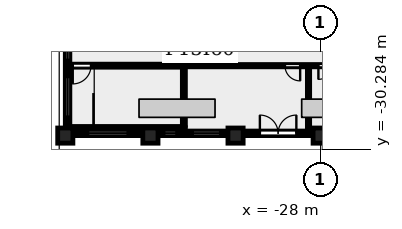
"""IFC4 building model, lengths in metres.
Left out: names, types, materials, properties, quantities, classifications, styles, units other than length and angle.
Written with IfcOpenShell. Run it as: python <this file> out.ifc"""

import sys

from ifc_helpers import new_model, si_unit, direction, frame, frame_2d, origin, origin_2d, place, context, subcontext, project, spatial, rectangle, circle, extrude, element, fill, save


model = new_model("IFC4")
c1 = context("Model", 3, precision=1e-05, world=origin(), true_north=direction((0.0, 1.0)))
c2 = subcontext(c1, "Body", "Model", "MODEL_VIEW")
j1 = project(units=[si_unit("LENGTHUNIT", "METRE"), si_unit("PLANEANGLEUNIT", "RADIAN")], contexts=[c1])
p1 = place(None, origin())
s1 = spatial("IfcSite", under=j1, at=p1, CompositionType="ELEMENT")
p2 = place(p1, origin())
s2 = spatial("IfcBuilding", under=s1, at=p2, CompositionType="ELEMENT")
p3 = place(p2, frame((0.0, 0.0, 25.7)))
s3 = spatial("IfcBuildingStorey", under=s2, at=p3, CompositionType="ELEMENT", Elevation=25.7)
for number, where, z_axis, x_axis in (
    (1, (-44.8, -29.4, 0.0), (0.0, 0.0, 1.0), (1.0, 0.0, 0.0)),
    (2, (-39.2, -29.4, 0.0), (0.0, 0.0, 1.0), (1.0, 0.0, 0.0)),
    (3, (-33.6, -29.4, 0.0), (0.0, 0.0, 1.0), (1.0, 0.0, 0.0)),
    (4, (-28.0, -29.4, 0.0), (0.0, 0.0, 1.0), (1.0, 0.0, 0.0)),
):
    element("IfcColumn", number, at=place(p3, frame(where, z_axis=z_axis, x_axis=x_axis)), inside=s3, PredefinedType="COLUMN", context=c2, shape_type="SweptSolid", body=[
        extrude(circle(Radius=0.5, at=origin_2d()), origin(), (0.0, 0.0, 1.0), 4.8),
    ])
p4 = place(p3, frame((-44.65, -22.9, 0.0), z_axis=(0.0, 0.0, 1.0), x_axis=(0.0, -1.0, 0.0)))
e5 = element("IfcWall", 5, at=p4, inside=s3, PredefinedType="SOLIDWALL", context=c2, shape_type="SweptSolid", body=[
    extrude(rectangle(XDim=6.0, YDim=0.3, at=frame_2d((3.0, 0.0))), origin(), (0.0, 0.0, 1.0), 3.65),
])
p5 = place(p4, frame((0.312, 0.0, 0.6)))
e6 = element("IfcOpeningElement", 6, at=p5, cuts=e5, PredefinedType="OPENING", context=c2, shape_type="SweptSolid", body=[
    extrude(rectangle(XDim=1.2, YDim=1.55, at=frame_2d((0.6, 0.775))), frame((0.0, 0.16, 0.0), z_axis=(0.0, -1.0, 0.0), x_axis=(1.0, 0.0, 0.0)), (0.0, 0.0, 1.0), 0.32),
])
p6 = place(p4, frame((2.65, 0.0, 0.9)))
e7 = element("IfcOpeningElement", 7, at=p6, cuts=e5, PredefinedType="OPENING", context=c2, shape_type="SweptSolid", body=[
    extrude(rectangle(XDim=2.6, YDim=1.25, at=frame_2d((1.3, 0.625))), frame((0.0, 0.16, 0.0), z_axis=(0.0, -1.0, 0.0), x_axis=(1.0, 0.0, 0.0)), (0.0, 0.0, 1.0), 0.32),
])
p7 = place(p3, frame((-44.3, -29.25, 0.0), z_axis=(0.0, 0.0, 1.0), x_axis=(1.0, 0.0, 0.0)))
e8 = element("IfcWall", 8, at=p7, inside=s3, PredefinedType="SOLIDWALL", context=c2, shape_type="SweptSolid", body=[
    extrude(rectangle(XDim=4.6, YDim=0.3, at=frame_2d((2.3, 0.0))), origin(), (0.0, 0.0, 1.0), 3.65),
])
p8 = place(p7, frame((1.0, 0.0, 0.9)))
e9 = element("IfcOpeningElement", 9, at=p8, cuts=e8, PredefinedType="OPENING", context=c2, shape_type="SweptSolid", body=[
    extrude(rectangle(XDim=2.6, YDim=1.25, at=frame_2d((1.3, 0.625))), frame((0.0, 0.16, 0.0), z_axis=(0.0, -1.0, 0.0), x_axis=(1.0, 0.0, 0.0)), (0.0, 0.0, 1.0), 0.32),
])
p9 = place(p3, frame((-38.7, -29.25, 0.0), z_axis=(0.0, 0.0, 1.0), x_axis=(1.0, 0.0, 0.0)))
e10 = element("IfcWall", 10, at=p9, inside=s3, PredefinedType="SOLIDWALL", context=c2, shape_type="SweptSolid", body=[
    extrude(rectangle(XDim=4.6, YDim=0.3, at=frame_2d((2.3, 0.0))), origin(), (0.0, 0.0, 1.0), 3.65),
])
p10 = place(p9, frame((0.413, 0.0, 0.6)))
e11 = element("IfcOpeningElement", 11, at=p10, cuts=e10, PredefinedType="OPENING", context=c2, shape_type="SweptSolid", body=[
    extrude(rectangle(XDim=0.8, YDim=1.55, at=frame_2d((0.4, 0.775))), frame((0.0, 0.16, 0.0), z_axis=(0.0, -1.0, 0.0), x_axis=(1.0, 0.0, 0.0)), (0.0, 0.0, 1.0), 0.32),
])
p11 = place(p9, frame((2.288, 0.0, 0.9)))
e12 = element("IfcOpeningElement", 12, at=p11, cuts=e10, PredefinedType="OPENING", context=c2, shape_type="SweptSolid", body=[
    extrude(rectangle(XDim=1.8, YDim=1.25, at=frame_2d((0.9, 0.625))), frame((0.0, 0.16, 0.0), z_axis=(0.0, -1.0, 0.0), x_axis=(1.0, 0.0, 0.0)), (0.0, 0.0, 1.0), 0.32),
])
p12 = place(p3, frame((-33.1, -29.25, 0.0), z_axis=(0.0, 0.0, 1.0), x_axis=(1.0, 0.0, 0.0)))
e13 = element("IfcWall", 13, at=p12, inside=s3, PredefinedType="SOLIDWALL", context=c2, shape_type="SweptSolid", body=[
    extrude(rectangle(XDim=4.6, YDim=0.3, at=frame_2d((2.3, 0.0))), origin(), (0.0, 0.0, 1.0), 3.65),
])
p13 = place(p12, frame((1.1, 0.0, 0.0)))
e14 = element("IfcOpeningElement", 14, at=p13, cuts=e13, PredefinedType="OPENING", context=c2, shape_type="SweptSolid", body=[
    extrude(rectangle(XDim=2.4, YDim=2.3, at=frame_2d((1.2, 1.15))), frame((0.0, 0.16, 0.0), z_axis=(0.0, -1.0, 0.0), x_axis=(1.0, 0.0, 0.0)), (0.0, 0.0, 1.0), 0.32),
])
p14 = place(p3, frame((-44.71, -28.9, 0.0), z_axis=(0.0, 0.0, 1.0), x_axis=(1.0, 0.0, 0.0)))
e15 = element("IfcWall", 15, at=p14, inside=s3, PredefinedType="SHEAR", context=c2, shape_type="SweptSolid", body=[
    extrude(rectangle(XDim=7.81, YDim=0.2, at=frame_2d((3.905, 0.0))), origin(), (0.0, 0.0, 1.0), 4.45),
])
p15 = place(p3, frame((-37.0, -24.8, 0.0), z_axis=(0.0, 0.0, 1.0), x_axis=(1.0, 0.0, 0.0)))
e16 = element("IfcWall", 16, at=p15, inside=s3, PredefinedType="PARTITIONING", context=c2, shape_type="SweptSolid", body=[
    extrude(rectangle(XDim=74.0, YDim=0.15, at=frame_2d((37.0, 0.0))), origin(), (0.0, 0.0, 1.0), 4.45),
])
p16 = place(p15, frame((6.65, 0.0, 0.0)))
e17 = element("IfcOpeningElement", 17, at=p16, cuts=e16, PredefinedType="OPENING", context=c2, shape_type="SweptSolid", body=[
    extrude(rectangle(XDim=1.0, YDim=2.1, at=frame_2d((0.5, 1.05))), frame((0.0, 0.085, 0.0), z_axis=(0.0, -1.0, 0.0), x_axis=(1.0, 0.0, 0.0)), (0.0, 0.0, 1.0), 0.17),
])
p17 = place(p15, frame((8.85, 0.0, 0.0)))
e18 = element("IfcOpeningElement", 18, at=p17, cuts=e16, PredefinedType="OPENING", context=c2, shape_type="SweptSolid", body=[
    extrude(rectangle(XDim=0.9, YDim=2.1, at=frame_2d((0.45, 1.05))), frame((0.0, 0.085, 0.0), z_axis=(0.0, -1.0, 0.0), x_axis=(1.0, 0.0, 0.0)), (0.0, 0.0, 1.0), 0.17),
])
p18 = place(p15, frame((35.35, 0.0, 0.0)))
e19 = element("IfcOpeningElement", 19, at=p18, cuts=e16, PredefinedType="OPENING", context=c2, shape_type="SweptSolid", body=[
    extrude(rectangle(XDim=1.0, YDim=2.1, at=frame_2d((0.5, 1.05))), frame((0.0, 0.085, 0.0), z_axis=(0.0, -1.0, 0.0), x_axis=(1.0, 0.0, 0.0)), (0.0, 0.0, 1.0), 0.17),
])
p19 = place(p15, frame((37.65, 0.0, 0.0)))
e20 = element("IfcOpeningElement", 20, at=p19, cuts=e16, PredefinedType="OPENING", context=c2, shape_type="SweptSolid", body=[
    extrude(rectangle(XDim=0.9, YDim=2.1, at=frame_2d((0.45, 1.05))), frame((0.0, 0.085, 0.0), z_axis=(0.0, -1.0, 0.0), x_axis=(1.0, 0.0, 0.0)), (0.0, 0.0, 1.0), 0.17),
])
p20 = place(p15, frame((53.4, 0.0, 0.0)))
e21 = element("IfcOpeningElement", 21, at=p20, cuts=e16, PredefinedType="OPENING", context=c2, shape_type="SweptSolid", body=[
    extrude(rectangle(XDim=1.0, YDim=2.1, at=frame_2d((0.5, 1.05))), frame((0.0, 0.085, 0.0), z_axis=(0.0, -1.0, 0.0), x_axis=(1.0, 0.0, 0.0)), (0.0, 0.0, 1.0), 0.17),
])
p21 = place(p15, frame((55.65, 0.0, 0.0)))
e22 = element("IfcOpeningElement", 22, at=p21, cuts=e16, PredefinedType="OPENING", context=c2, shape_type="SweptSolid", body=[
    extrude(rectangle(XDim=1.0, YDim=2.1, at=frame_2d((0.5, 1.05))), frame((0.0, 0.085, 0.0), z_axis=(0.0, -1.0, 0.0), x_axis=(1.0, 0.0, 0.0)), (0.0, 0.0, 1.0), 0.17),
])
p22 = place(p3, frame((-44.71, -24.8, 0.0), z_axis=(0.0, 0.0, 1.0), x_axis=(1.0, 0.0, 0.0)))
e23 = element("IfcWall", 23, at=p22, inside=s3, PredefinedType="SHEAR", context=c2, shape_type="SweptSolid", body=[
    extrude(rectangle(XDim=7.71, YDim=0.2, at=frame_2d((3.855, 0.0))), origin(), (0.0, 0.0, 1.0), 4.45),
])
p23 = place(p22, frame((0.4, 0.0, 0.0)))
e24 = element("IfcOpeningElement", 24, at=p23, cuts=e23, PredefinedType="OPENING", context=c2, shape_type="SweptSolid", body=[
    extrude(rectangle(XDim=1.2, YDim=2.1, at=frame_2d((0.6, 1.05))), frame((0.0, 0.11, 0.0), z_axis=(0.0, -1.0, 0.0), x_axis=(1.0, 0.0, 0.0)), (0.0, 0.0, 1.0), 0.22),
])
p24 = place(p3, frame((-37.0, -28.8, 0.0), z_axis=(0.0, 0.0, 1.0), x_axis=(0.0, 1.0, 0.0)))
e25 = element("IfcWall", 25, at=p24, inside=s3, PredefinedType="SHEAR", context=c2, shape_type="SweptSolid", body=[
    extrude(rectangle(XDim=3.925, YDim=0.2, at=frame_2d((1.962, 0.0))), origin(), (0.0, 0.0, 1.0), 4.45),
])
p25 = place(p3, frame((-28.8, -29.08, 0.0), z_axis=(0.0, 0.0, 1.0), x_axis=(0.0, 1.0, 0.0)))
e26 = element("IfcWall", 26, at=p25, inside=s3, PredefinedType="PARTITIONING", context=c2, shape_type="SweptSolid", body=[
    extrude(rectangle(XDim=4.205, YDim=0.15, at=frame_2d((2.103, 0.0))), origin(), (0.0, 0.0, 1.0), 4.45),
])
p26 = place(p13, origin())
e27 = element("IfcDoor", 27, at=p26, inside=s3, OperationType="SINGLE_SWING_LEFT", PredefinedType="DOOR", context=c2, shape_type="SweptSolid", body=[
    extrude(rectangle(XDim=2.4, YDim=2.3, at=frame_2d((1.2, 1.15))), frame((0.0, 0.025, 0.0), z_axis=(0.0, -1.0, 0.0), x_axis=(1.0, 0.0, 0.0)), (0.0, 0.0, 1.0), 0.05),
])
fill(e14, e27)
p27 = place(p23, origin())
e28 = element("IfcDoor", 28, at=p27, inside=s3, OperationType="SINGLE_SWING_LEFT", PredefinedType="DOOR", context=c2, shape_type="SweptSolid", body=[
    extrude(rectangle(XDim=1.2, YDim=2.1, at=frame_2d((0.6, 1.05))), frame((0.0, 0.025, 0.0), z_axis=(0.0, -1.0, 0.0), x_axis=(1.0, 0.0, 0.0)), (0.0, 0.0, 1.0), 0.05),
])
fill(e24, e28)
p28 = place(p16, origin())
e29 = element("IfcDoor", 29, at=p28, inside=s3, OperationType="SINGLE_SWING_RIGHT", PredefinedType="DOOR", context=c2, shape_type="SweptSolid", body=[
    extrude(rectangle(XDim=1.0, YDim=2.1, at=frame_2d((0.5, 1.05))), frame((0.0, 0.025, 0.0), z_axis=(0.0, -1.0, 0.0), x_axis=(1.0, 0.0, 0.0)), (0.0, 0.0, 1.0), 0.05),
])
fill(e17, e29)
p29 = place(p17, origin())
e30 = element("IfcDoor", 30, at=p29, inside=s3, OperationType="SINGLE_SWING_LEFT", PredefinedType="DOOR", context=c2, shape_type="SweptSolid", body=[
    extrude(rectangle(XDim=0.9, YDim=2.1, at=frame_2d((0.45, 1.05))), frame((0.0, 0.025, 0.0), z_axis=(0.0, -1.0, 0.0), x_axis=(1.0, 0.0, 0.0)), (0.0, 0.0, 1.0), 0.05),
])
fill(e18, e30)
p30 = place(p5, origin())
e31 = element("IfcWindow", 31, at=p30, inside=s3, PartitioningType="SINGLE_PANEL", PredefinedType="WINDOW", context=c2, shape_type="SweptSolid", body=[
    extrude(rectangle(XDim=1.2, YDim=1.55, at=frame_2d((0.6, 0.775))), frame((0.0, 0.03, 0.0), z_axis=(0.0, -1.0, 0.0), x_axis=(1.0, 0.0, 0.0)), (0.0, 0.0, 1.0), 0.06),
])
fill(e6, e31)
p31 = place(p6, origin())
e32 = element("IfcWindow", 32, at=p31, inside=s3, PartitioningType="SINGLE_PANEL", PredefinedType="WINDOW", context=c2, shape_type="SweptSolid", body=[
    extrude(rectangle(XDim=2.6, YDim=1.25, at=frame_2d((1.3, 0.625))), frame((0.0, 0.03, 0.0), z_axis=(0.0, -1.0, 0.0), x_axis=(1.0, 0.0, 0.0)), (0.0, 0.0, 1.0), 0.06),
])
fill(e7, e32)
p32 = place(p8, origin())
e33 = element("IfcWindow", 33, at=p32, inside=s3, PartitioningType="SINGLE_PANEL", PredefinedType="WINDOW", context=c2, shape_type="SweptSolid", body=[
    extrude(rectangle(XDim=2.6, YDim=1.25, at=frame_2d((1.3, 0.625))), frame((0.0, 0.03, 0.0), z_axis=(0.0, -1.0, 0.0), x_axis=(1.0, 0.0, 0.0)), (0.0, 0.0, 1.0), 0.06),
])
fill(e9, e33)
p33 = place(p10, origin())
e34 = element("IfcWindow", 34, at=p33, inside=s3, PartitioningType="SINGLE_PANEL", PredefinedType="WINDOW", context=c2, shape_type="SweptSolid", body=[
    extrude(rectangle(XDim=0.8, YDim=1.55, at=frame_2d((0.4, 0.775))), frame((0.0, 0.03, 0.0), z_axis=(0.0, -1.0, 0.0), x_axis=(1.0, 0.0, 0.0)), (0.0, 0.0, 1.0), 0.06),
])
fill(e11, e34)
p34 = place(p11, origin())
e35 = element("IfcWindow", 35, at=p34, inside=s3, PartitioningType="SINGLE_PANEL", PredefinedType="WINDOW", context=c2, shape_type="SweptSolid", body=[
    extrude(rectangle(XDim=1.8, YDim=1.25, at=frame_2d((0.9, 0.625))), frame((0.0, 0.03, 0.0), z_axis=(0.0, -1.0, 0.0), x_axis=(1.0, 0.0, 0.0)), (0.0, 0.0, 1.0), 0.06),
])
fill(e12, e35)
save(model, sys.argv[1])
